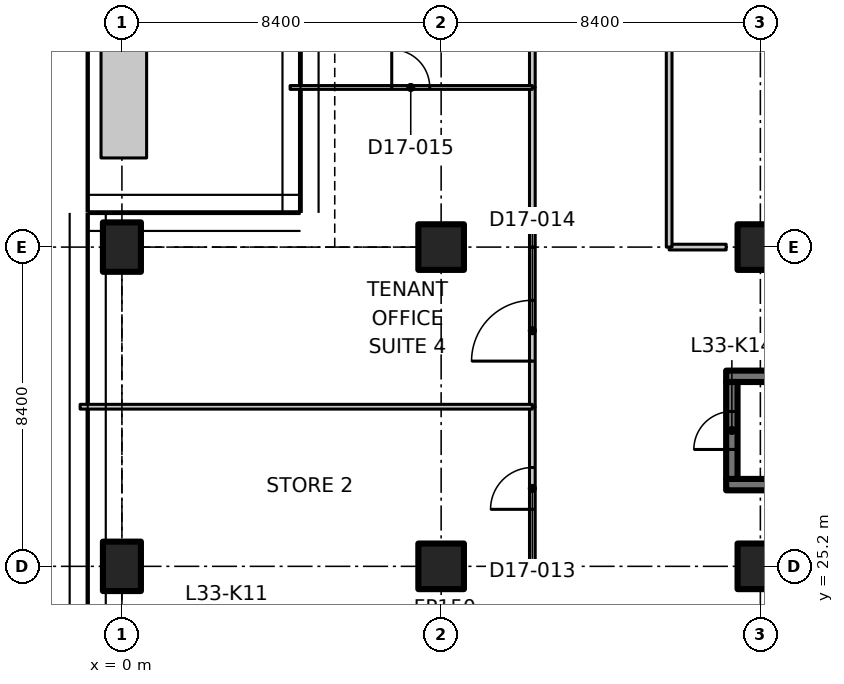
"""IFC4 building model, lengths in metres.
Left out: names, types, materials, properties, quantities, classifications, styles, units other than length and angle.
Written with IfcOpenShell. Run it as: python <this file> out.ifc"""

import sys

from ifc_helpers import new_model, si_unit, direction, frame, frame_2d, origin, origin_2d, place, context, subcontext, project, spatial, polyline, rectangle, outline, extrude, element, fill, save


model = new_model("IFC4")
c1 = context("Model", 3, precision=1e-05, world=origin(), true_north=direction((0.0, 1.0)))
c2 = subcontext(c1, "Body", "Model", "MODEL_VIEW")
j1 = project(units=[si_unit("LENGTHUNIT", "METRE"), si_unit("PLANEANGLEUNIT", "RADIAN")], contexts=[c1])
p1 = place(None, origin())
s1 = spatial("IfcSite", under=j1, at=p1, CompositionType="ELEMENT")
p2 = place(p1, origin())
s2 = spatial("IfcBuilding", under=s1, at=p2, CompositionType="ELEMENT")
p3 = place(p2, frame((0.0, 0.0, 134.9)))
s3 = spatial("IfcBuildingStorey", under=s2, at=p3, CompositionType="ELEMENT", Elevation=134.9)
for number, where, z_axis, x_axis in (
    (1, (0.0, 25.2, 0.0), (0.0, 0.0, 1.0), (1.0, 0.0, 0.0)),
    (2, (0.0, 33.6, 0.0), (0.0, 0.0, 1.0), (1.0, 0.0, 0.0)),
):
    element("IfcColumn", number, at=place(p3, frame(where, z_axis=z_axis, x_axis=x_axis)), inside=s3, PredefinedType="COLUMN", context=c2, shape_type="SweptSolid", body=[
        extrude(rectangle(XDim=1.0, YDim=1.3, at=origin_2d()), origin(), (0.0, 0.0, 1.0), 3.35),
    ])
for number, where, z_axis, x_axis in (
    (3, (8.4, 25.2, 0.0), (0.0, 0.0, 1.0), (1.0, 0.0, 0.0)),
    (4, (8.4, 33.6, 0.0), (0.0, 0.0, 1.0), (1.0, 0.0, 0.0)),
    (5, (16.8, 25.2, 0.0), (0.0, 0.0, 1.0), (1.0, 0.0, 0.0)),
    (6, (16.8, 33.6, 0.0), (0.0, 0.0, 1.0), (1.0, 0.0, 0.0)),
):
    element("IfcColumn", number, at=place(p3, frame(where, z_axis=z_axis, x_axis=x_axis)), inside=s3, PredefinedType="COLUMN", context=c2, shape_type="SweptSolid", body=[
        extrude(rectangle(XDim=1.2, YDim=1.2, at=origin_2d()), origin(), (0.0, 0.0, 1.0), 3.35),
    ])
p4 = place(p3, frame((0.05, 61.106, 0.0), z_axis=(0.0, 0.0, 1.0), x_axis=(0.0, -1.0, 0.0)))
e7 = element("IfcWall", 7, at=p4, inside=s3, PredefinedType="PARAPET", context=c2, shape_type="SweptSolid", body=[
    extrude(rectangle(XDim=25.161, YDim=1.2, at=frame_2d((12.581, 0.0))), origin(), (0.0, 0.0, 1.0), 1.3),
])
for number, where, z_axis, x_axis in (
    (8, (15.9, 27.35, 0.0), (0.0, 0.0, 1.0), (1.0, 0.0, 0.0)),
    (9, (15.9, 30.2, 0.0), (0.0, 0.0, 1.0), (1.0, 0.0, 0.0)),
):
    element("IfcWall", number, at=place(p3, frame(where, z_axis=z_axis, x_axis=x_axis)), inside=s3, PredefinedType="SHEAR", context=c2, shape_type="SweptSolid", body=[
        extrude(rectangle(XDim=8.2, YDim=0.3, at=frame_2d((4.1, 0.0))), origin(), (0.0, 0.0, 1.0), 3.35),
    ])
p5 = place(p3, frame((16.05, 27.5, 0.0), z_axis=(0.0, 0.0, 1.0), x_axis=(0.0, 1.0, 0.0)))
e10 = element("IfcWall", 10, at=p5, inside=s3, PredefinedType="SHEAR", context=c2, shape_type="SweptSolid", body=[
    extrude(rectangle(XDim=2.55, YDim=0.3, at=frame_2d((1.275, 0.0))), origin(), (0.0, 0.0, 1.0), 3.35),
])
p6 = place(p5, frame((0.775, 0.0, 0.0)))
e11 = element("IfcOpeningElement", 11, at=p6, cuts=e10, PredefinedType="OPENING", context=c2, shape_type="SweptSolid", body=[
    extrude(rectangle(XDim=1.0, YDim=2.1, at=frame_2d((0.5, 1.05))), frame((0.0, 0.16, 0.0), z_axis=(0.0, -1.0, 0.0), x_axis=(1.0, 0.0, 0.0)), (0.0, 0.0, 1.0), 0.32),
])
p7 = place(p3, frame((10.8, 25.2, 0.0), z_axis=(0.0, 0.0, 1.0), x_axis=(0.0, 1.0, 0.0)))
e12 = element("IfcWall", 12, at=p7, inside=s3, PredefinedType="PARTITIONING", context=c2, shape_type="SweptSolid", body=[
    extrude(rectangle(XDim=4.2, YDim=0.15, at=frame_2d((2.1, 0.0))), origin(), (0.0, 0.0, 1.0), 3.33),
])
p8 = place(p7, frame((1.5, 0.0, 0.0)))
e13 = element("IfcOpeningElement", 13, at=p8, cuts=e12, PredefinedType="OPENING", context=c2, shape_type="SweptSolid", body=[
    extrude(rectangle(XDim=1.1, YDim=2.1, at=frame_2d((0.55, 1.05))), frame((0.0, 0.085, 0.0), z_axis=(0.0, -1.0, 0.0), x_axis=(1.0, 0.0, 0.0)), (0.0, 0.0, 1.0), 0.17),
])
p9 = place(p3, frame((10.8, 29.4, 0.0), z_axis=(0.0, 0.0, 1.0), x_axis=(0.0, 1.0, 0.0)))
e14 = element("IfcWall", 14, at=p9, inside=s3, PredefinedType="PARTITIONING", context=c2, shape_type="SweptSolid", body=[
    extrude(rectangle(XDim=4.2, YDim=0.15, at=frame_2d((2.1, 0.0))), origin(), (0.0, 0.0, 1.0), 3.33),
])
p10 = place(p9, frame((1.2, 0.0, 0.0)))
e15 = element("IfcOpeningElement", 15, at=p10, cuts=e14, PredefinedType="OPENING", context=c2, shape_type="SweptSolid", body=[
    extrude(rectangle(XDim=1.6, YDim=2.1, at=frame_2d((0.8, 1.05))), frame((0.0, 0.085, 0.0), z_axis=(0.0, -1.0, 0.0), x_axis=(1.0, 0.0, 0.0)), (0.0, 0.0, 1.0), 0.17),
])
p11 = place(p3, frame((14.4, 33.6, 0.0), z_axis=(0.0, 0.0, 1.0), x_axis=(1.0, 0.0, 0.0)))
e16 = element("IfcWall", 16, at=p11, inside=s3, PredefinedType="PARTITIONING", context=c2, shape_type="SweptSolid", body=[
    extrude(rectangle(XDim=1.5, YDim=0.15, at=frame_2d((0.75, 0.0))), origin(), (0.0, 0.0, 1.0), 3.33),
])
for number, where, z_axis, x_axis in (
    (17, (10.8, 33.6, 0.0), (0.0, 0.0, 1.0), (0.0, 1.0, 0.0)),
    (18, (10.8, 37.8, 0.0), (0.0, 0.0, 1.0), (0.0, 1.0, 0.0)),
):
    element("IfcWall", number, at=place(p3, frame(where, z_axis=z_axis, x_axis=x_axis)), inside=s3, PredefinedType="PARTITIONING", context=c2, shape_type="SweptSolid", body=[
        extrude(rectangle(XDim=4.2, YDim=0.15, at=frame_2d((2.1, 0.0))), origin(), (0.0, 0.0, 1.0), 3.33),
    ])
p12 = place(p3, frame((14.4, 42.0, 0.0), z_axis=(0.0, 0.0, 1.0), x_axis=(0.0, -1.0, 0.0)))
e19 = element("IfcWall", 19, at=p12, inside=s3, PredefinedType="PARTITIONING", context=c2, shape_type="SweptSolid", body=[
    extrude(rectangle(XDim=8.4, YDim=0.15, at=frame_2d((4.2, 0.0))), origin(), (0.0, 0.0, 1.0), 3.33),
])
p13 = place(p3, frame((-1.1, 29.4, 0.0), z_axis=(0.0, 0.0, 1.0), x_axis=(1.0, 0.0, 0.0)))
e20 = element("IfcWall", 20, at=p13, inside=s3, PredefinedType="PARTITIONING", context=c2, shape_type="SweptSolid", body=[
    extrude(outline(polyline([(0.0, 0.0), (11.9, 0.0), (11.9, 3.33), (1.55, 3.33), (1.548, 2.98), (0.652, 2.98), (0.65, 3.33), (0.0, 3.33), (0.0, 0.0)])), frame((0.0, 0.062, 0.0), z_axis=(0.0, -1.0, 0.0), x_axis=(1.0, 0.0, 0.0)), (0.0, 0.0, 1.0), 0.125),
])
p14 = place(p3, frame((4.426, 37.8, 0.0), z_axis=(0.0, 0.0, 1.0), x_axis=(1.0, 0.0, 0.0)))
e21 = element("IfcWall", 21, at=p14, inside=s3, PredefinedType="PARTITIONING", context=c2, shape_type="SweptSolid", body=[
    extrude(outline(polyline([(0.0, 0.0), (6.374, 0.0), (6.374, 3.33), (1.624, 3.33), (1.622, 2.98), (0.726, 2.98), (0.724, 3.33), (0.074, 3.33), (0.0, 3.33), (0.0, 0.0)])), frame((0.0, 0.05, 0.0), z_axis=(0.0, -1.0, 0.0), x_axis=(1.0, 0.0, 0.0)), (0.0, 0.0, 1.0), 0.1),
])
p15 = place(p14, frame((2.674, 0.0, 0.0)))
e22 = element("IfcOpeningElement", 22, at=p15, cuts=e21, PredefinedType="OPENING", context=c2, shape_type="SweptSolid", body=[
    extrude(rectangle(XDim=1.0, YDim=2.1, at=frame_2d((0.5, 1.05))), frame((0.0, 0.06, 0.0), z_axis=(0.0, -1.0, 0.0), x_axis=(1.0, 0.0, 0.0)), (0.0, 0.0, 1.0), 0.12),
])
p16 = place(p6, origin())
e23 = element("IfcDoor", 23, at=p16, inside=s3, OperationType="SINGLE_SWING_RIGHT", PredefinedType="DOOR", context=c2, shape_type="SweptSolid", body=[
    extrude(rectangle(XDim=1.0, YDim=2.1, at=frame_2d((0.5, 1.05))), frame((0.0, 0.025, 0.0), z_axis=(0.0, -1.0, 0.0), x_axis=(1.0, 0.0, 0.0)), (0.0, 0.0, 1.0), 0.05),
])
fill(e11, e23)
p17 = place(p8, origin())
e24 = element("IfcDoor", 24, at=p17, inside=s3, OperationType="SINGLE_SWING_LEFT", PredefinedType="DOOR", context=c2, shape_type="SweptSolid", body=[
    extrude(rectangle(XDim=1.1, YDim=2.1, at=frame_2d((0.55, 1.05))), frame((0.0, 0.025, 0.0), z_axis=(0.0, -1.0, 0.0), x_axis=(1.0, 0.0, 0.0)), (0.0, 0.0, 1.0), 0.05),
])
fill(e13, e24)
p18 = place(p10, origin())
e25 = element("IfcDoor", 25, at=p18, inside=s3, OperationType="DOUBLE_DOOR_SINGLE_SWING", PredefinedType="DOOR", context=c2, shape_type="SweptSolid", body=[
    extrude(rectangle(XDim=1.6, YDim=2.1, at=frame_2d((0.8, 1.05))), frame((0.0, 0.025, 0.0), z_axis=(0.0, -1.0, 0.0), x_axis=(1.0, 0.0, 0.0)), (0.0, 0.0, 1.0), 0.05),
])
fill(e15, e25)
p19 = place(p15, origin())
e26 = element("IfcDoor", 26, at=p19, inside=s3, OperationType="SINGLE_SWING_LEFT", PredefinedType="DOOR", context=c2, shape_type="SweptSolid", body=[
    extrude(rectangle(XDim=1.0, YDim=2.1, at=frame_2d((0.5, 1.05))), frame((0.0, 0.025, 0.0), z_axis=(0.0, -1.0, 0.0), x_axis=(1.0, 0.0, 0.0)), (0.0, 0.0, 1.0), 0.05),
])
fill(e22, e26)
save(model, sys.argv[1])
